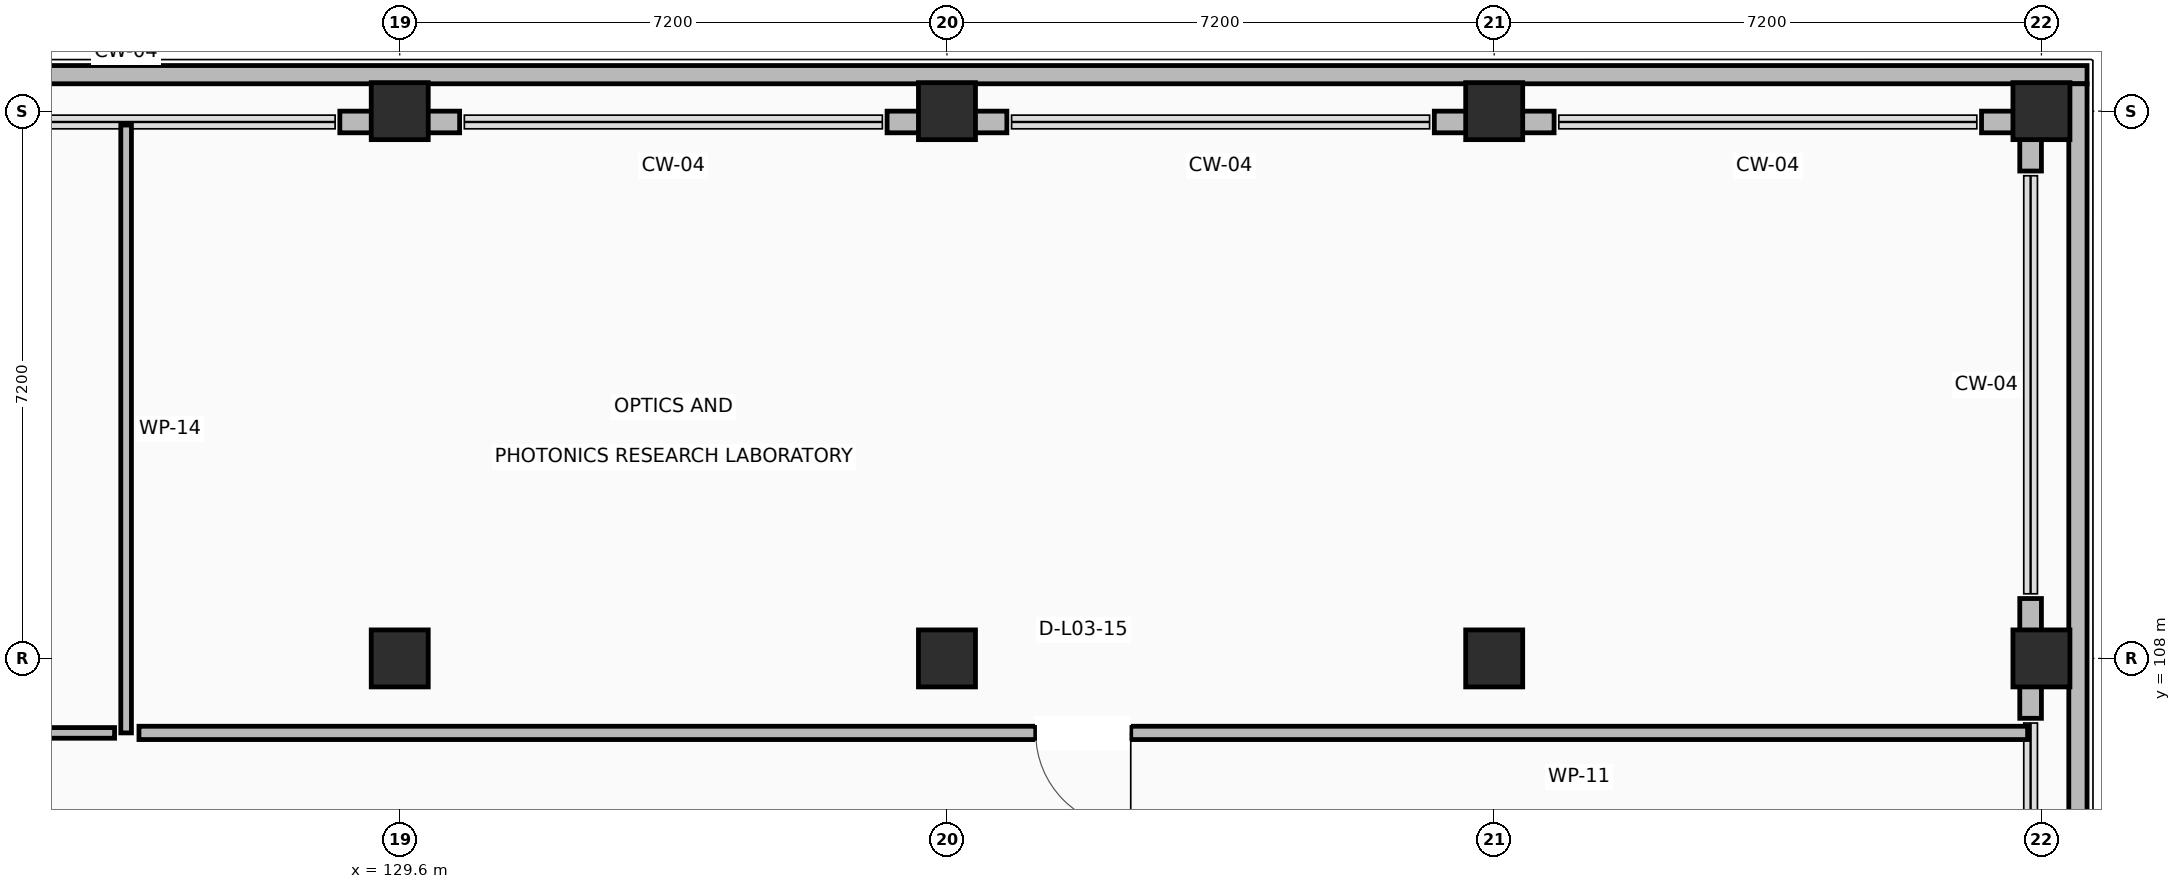
"""IFC4 building model, lengths in metres.
Left out: names, types, materials, properties, quantities, classifications, styles, units other than length and angle.
Written with IfcOpenShell. Run it as: python <this file> out.ifc"""

import sys

from ifc_helpers import new_model, si_unit, direction, frame, frame_2d, origin, origin_2d, place, context, subcontext, project, spatial, rectangle, extrude, element, fill, save


model = new_model("IFC4")
c1 = context("Model", 3, precision=1e-05, world=origin(), true_north=direction((0.0, 1.0)))
c2 = subcontext(c1, "Body", "Model", "MODEL_VIEW")
j1 = project(units=[si_unit("LENGTHUNIT", "METRE"), si_unit("PLANEANGLEUNIT", "RADIAN")], contexts=[c1])
p1 = place(None, origin())
s1 = spatial("IfcSite", under=j1, at=p1, CompositionType="ELEMENT")
p2 = place(p1, origin())
s2 = spatial("IfcBuilding", under=s1, at=p2, CompositionType="ELEMENT")
p3 = place(p2, frame((0.0, 0.0, 13.5)))
s3 = spatial("IfcBuildingStorey", under=s2, at=p3, CompositionType="ELEMENT", Elevation=13.5)
for number, where, z_axis, x_axis in (
    (1, (129.6, 108.0, 0.0), (0.0, 0.0, 1.0), (1.0, 0.0, 0.0)),
    (2, (129.6, 115.2, 0.0), (0.0, 0.0, 1.0), (1.0, 0.0, 0.0)),
    (3, (136.8, 108.0, 0.0), (0.0, 0.0, 1.0), (1.0, 0.0, 0.0)),
    (4, (136.8, 115.2, 0.0), (0.0, 0.0, 1.0), (1.0, 0.0, 0.0)),
    (5, (144.0, 108.0, 0.0), (0.0, 0.0, 1.0), (1.0, 0.0, 0.0)),
    (6, (144.0, 115.2, 0.0), (0.0, 0.0, 1.0), (1.0, 0.0, 0.0)),
    (7, (151.2, 108.0, 0.0), (0.0, 0.0, 1.0), (1.0, 0.0, 0.0)),
    (8, (151.2, 115.2, 0.0), (0.0, 0.0, 1.0), (1.0, 0.0, 0.0)),
):
    element("IfcColumn", number, at=place(p3, frame(where, z_axis=z_axis, x_axis=x_axis)), inside=s3, PredefinedType="COLUMN", context=c2, shape_type="SweptSolid", body=[
        extrude(rectangle(XDim=0.75, YDim=0.75, at=origin_2d()), origin(), (0.0, 0.0, 1.0), 4.22),
    ])
p4 = place(p3, frame((151.058, 107.212, 0.0), z_axis=(0.0, 0.0, 1.0), x_axis=(0.0, 1.0, 0.0)))
e9 = element("IfcWall", 9, at=p4, inside=s3, PredefinedType="STANDARD", context=c2, shape_type="SweptSolid", body=[
    extrude(rectangle(XDim=1.576, YDim=0.285, at=frame_2d((0.788, 0.0))), origin(), (0.0, 0.0, 1.0), 3.26),
])
p5 = place(p3, frame((151.058, 114.412, 0.0), z_axis=(0.0, 0.0, 1.0), x_axis=(0.0, 1.0, 0.0)))
e10 = element("IfcWall", 10, at=p5, inside=s3, PredefinedType="STANDARD", context=c2, shape_type="SweptSolid", body=[
    extrude(rectangle(XDim=0.503, YDim=0.285, at=frame_2d((0.251, 0.0))), origin(), (0.0, 0.0, 1.0), 3.26),
])
p6 = place(p3, frame((151.2, 115.058, 0.0), z_axis=(0.0, 0.0, 1.0), x_axis=(-1.0, 0.0, 0.0)))
e11 = element("IfcWall", 11, at=p6, inside=s3, PredefinedType="STANDARD", context=c2, shape_type="SweptSolid", body=[
    extrude(rectangle(XDim=0.788, YDim=0.285, at=frame_2d((0.394, 0.0))), origin(), (0.0, 0.0, 1.0), 3.26),
])
p7 = place(p3, frame((144.788, 115.058, 0.0), z_axis=(0.0, 0.0, 1.0), x_axis=(-1.0, 0.0, 0.0)))
e12 = element("IfcWall", 12, at=p7, inside=s3, PredefinedType="STANDARD", context=c2, shape_type="SweptSolid", body=[
    extrude(rectangle(XDim=1.576, YDim=0.285, at=frame_2d((0.788, 0.0))), origin(), (0.0, 0.0, 1.0), 3.26),
])
for number, where, z_axis, x_axis in (
    (13, (137.588, 115.058, 0.0), (0.0, 0.0, 1.0), (-1.0, 0.0, 0.0)),
    (14, (130.388, 115.058, 0.0), (0.0, 0.0, 1.0), (-1.0, 0.0, 0.0)),
):
    element("IfcWall", number, at=place(p3, frame(where, z_axis=z_axis, x_axis=x_axis)), inside=s3, PredefinedType="STANDARD", context=c2, shape_type="SweptSolid", body=[
        extrude(rectangle(XDim=1.576, YDim=0.285, at=frame_2d((0.788, 0.0))), origin(), (0.0, 0.0, 1.0), 3.26),
    ])
p8 = place(p3, frame((78.6, 115.68, 0.0), z_axis=(0.0, 0.0, 1.0), x_axis=(1.0, 0.0, 0.0)))
e15 = element("IfcWall", 15, at=p8, inside=s3, PredefinedType="PARAPET", context=c2, shape_type="SweptSolid", body=[
    extrude(rectangle(XDim=73.2, YDim=0.24, at=frame_2d((36.6, 0.0))), origin(), (0.0, 0.0, 1.0), 1.12),
])
p9 = place(p3, frame((151.68, 115.56, 0.0), z_axis=(0.0, 0.0, 1.0), x_axis=(0.0, -1.0, 0.0)))
e16 = element("IfcWall", 16, at=p9, inside=s3, PredefinedType="PARAPET", context=c2, shape_type="SweptSolid", body=[
    extrude(rectangle(XDim=21.36, YDim=0.24, at=frame_2d((10.68, 0.0))), origin(), (0.0, 0.0, 1.0), 1.12),
])
p10 = place(p3, frame((126.0, 115.017, 0.0), z_axis=(0.0, 0.0, 1.0), x_axis=(0.0, -1.0, 0.0)))
e17 = element("IfcWall", 17, at=p10, inside=s3, PredefinedType="PARTITIONING", context=c2, shape_type="SweptSolid", body=[
    extrude(rectangle(XDim=7.997, YDim=0.14, at=frame_2d((3.999, 0.0))), origin(), (0.0, 0.0, 1.0), 3.26),
])
p11 = place(p3, frame((125.848, 107.02, 0.0), z_axis=(0.0, 0.0, 1.0), x_axis=(-1.0, 0.0, 0.0)))
e18 = element("IfcWall", 18, at=p11, inside=s3, PredefinedType="PARTITIONING", context=c2, shape_type="SweptSolid", body=[
    extrude(rectangle(XDim=17.652, YDim=0.14, at=frame_2d((8.826, 0.0))), origin(), (0.0, 0.0, 1.0), 3.26),
])
p12 = place(p11, frame((8.336, 0.0, 0.0)))
e19 = element("IfcOpeningElement", 19, at=p12, cuts=e18, PredefinedType="OPENING", context=c2, shape_type="SweptSolid", body=[
    extrude(rectangle(XDim=0.98, YDim=2.1, at=frame_2d((0.49, 1.05))), frame((0.0, 0.08, 0.0), z_axis=(0.0, -1.0, 0.0), x_axis=(1.0, 0.0, 0.0)), (0.0, 0.0, 1.0), 0.16),
])
p13 = place(p3, frame((151.018, 107.02, 0.0), z_axis=(0.0, 0.0, 1.0), x_axis=(-1.0, 0.0, 0.0)))
e20 = element("IfcWall", 20, at=p13, inside=s3, PredefinedType="PARTITIONING", context=c2, shape_type="SweptSolid", body=[
    extrude(rectangle(XDim=24.849, YDim=0.175, at=frame_2d((12.425, 0.0))), origin(), (0.0, 0.0, 1.0), 3.26),
])
p14 = place(p13, frame((11.8, 0.0, 0.0)))
e21 = element("IfcOpeningElement", 21, at=p14, cuts=e20, PredefinedType="OPENING", context=c2, shape_type="SweptSolid", body=[
    extrude(rectangle(XDim=1.25, YDim=2.15, at=frame_2d((0.625, 1.075))), frame((0.0, 0.097, 0.0), z_axis=(0.0, -1.0, 0.0), x_axis=(1.0, 0.0, 0.0)), (0.0, 0.0, 1.0), 0.195),
])
p15 = place(p14, origin())
e22 = element("IfcDoor", 22, at=p15, inside=s3, OperationType="SINGLE_SWING_LEFT", PredefinedType="DOOR", context=c2, shape_type="SweptSolid", body=[
    extrude(rectangle(XDim=1.25, YDim=2.15, at=frame_2d((0.625, 1.075))), frame((0.0, 0.025, 0.0), z_axis=(0.0, -1.0, 0.0), x_axis=(1.0, 0.0, 0.0)), (0.0, 0.0, 1.0), 0.05),
])
fill(e21, e22)
save(model, sys.argv[1])
